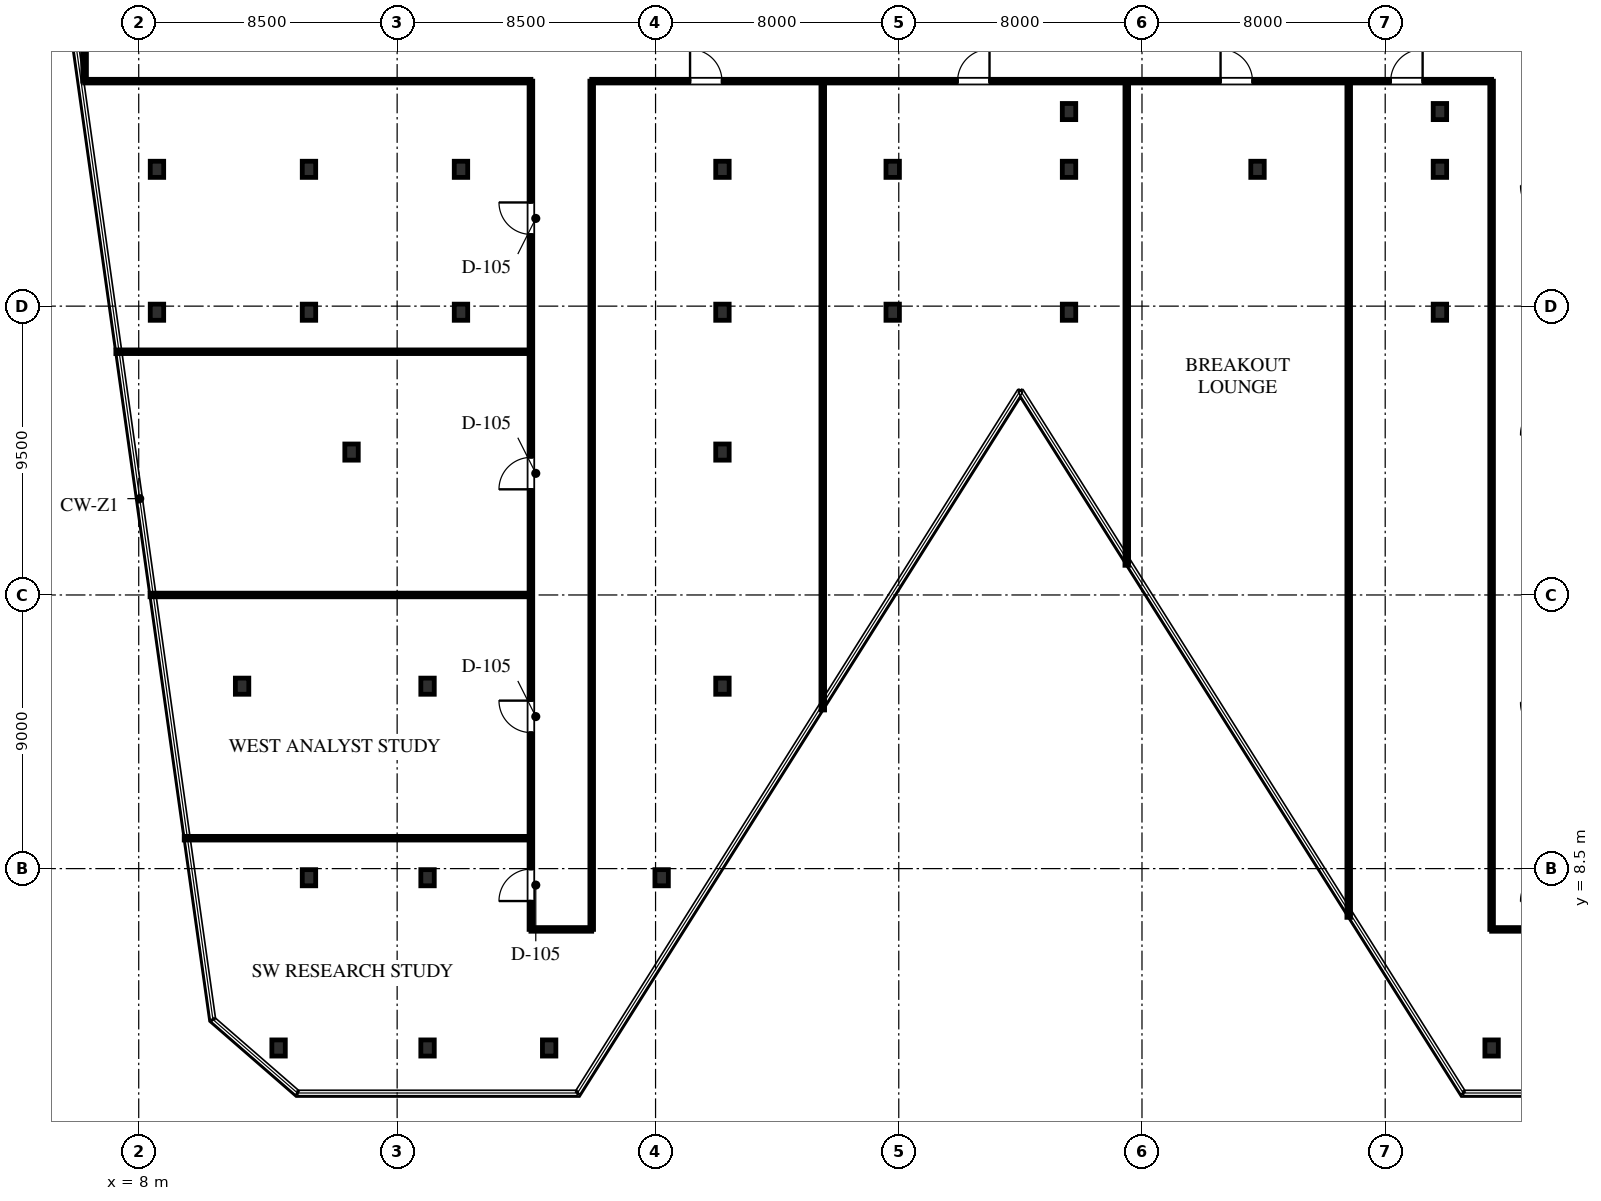
"""IFC4 building model, lengths in metres.
Left out: names, types, materials, properties, quantities, classifications, styles, units other than length and angle.
Written with IfcOpenShell. Run it as: python <this file> out.ifc"""

import sys

from ifc_helpers import new_model, si_unit, direction, frame, frame_2d, origin, origin_2d, place, context, subcontext, project, spatial, rectangle, i_section, extrude, element, fill, save


model = new_model("IFC4")
c1 = context("Model", 3, precision=1e-05, world=origin(), true_north=direction((0.0, 1.0)))
c2 = subcontext(c1, "Body", "Model", "MODEL_VIEW")
j1 = project(units=[si_unit("LENGTHUNIT", "METRE"), si_unit("PLANEANGLEUNIT", "RADIAN")], contexts=[c1])
p1 = place(None, origin())
s1 = spatial("IfcSite", under=j1, at=p1, CompositionType="ELEMENT")
p2 = place(p1, origin())
s2 = spatial("IfcBuilding", under=s1, at=p2, CompositionType="ELEMENT")
p3 = place(p2, frame((0.0, 0.0, 53.5)))
s3 = spatial("IfcBuildingStorey", under=s2, at=p3, CompositionType="ELEMENT", Elevation=53.5)
for number, where, z_axis, x_axis in (
    (1, (12.6, 2.6, 0.0), (0.0, 0.0, 1.0), (1.0, 0.0, 0.0)),
    (2, (15.0, 22.2, 0.0), (0.0, 0.0, 1.0), (1.0, 0.0, 0.0)),
    (3, (27.2, 22.2, 0.0), (0.0, 0.0, 1.0), (1.0, 0.0, 0.0)),
    (4, (8.6, 26.8, 0.0), (0.0, 0.0, 1.0), (1.0, 0.0, 0.0)),
    (5, (13.6, 26.8, 0.0), (0.0, 0.0, 1.0), (1.0, 0.0, 0.0)),
    (6, (18.6, 26.8, 0.0), (0.0, 0.0, 1.0), (1.0, 0.0, 0.0)),
    (7, (27.2, 26.8, 0.0), (0.0, 0.0, 1.0), (1.0, 0.0, 0.0)),
    (8, (32.8, 26.8, 0.0), (0.0, 0.0, 1.0), (1.0, 0.0, 0.0)),
    (9, (38.6, 26.8, 0.0), (0.0, 0.0, 1.0), (1.0, 0.0, 0.0)),
    (10, (50.8, 26.8, 0.0), (0.0, 0.0, 1.0), (1.0, 0.0, 0.0)),
    (11, (8.6, 31.5, 0.0), (0.0, 0.0, 1.0), (1.0, 0.0, 0.0)),
    (12, (13.6, 31.5, 0.0), (0.0, 0.0, 1.0), (1.0, 0.0, 0.0)),
    (13, (17.5, 2.6, 0.0), (0.0, 0.0, 1.0), (1.0, 0.0, 0.0)),
    (14, (18.6, 31.5, 0.0), (0.0, 0.0, 1.0), (1.0, 0.0, 0.0)),
    (15, (27.2, 31.5, 0.0), (0.0, 0.0, 1.0), (1.0, 0.0, 0.0)),
    (16, (32.8, 31.5, 0.0), (0.0, 0.0, 1.0), (1.0, 0.0, 0.0)),
    (17, (38.6, 31.5, 0.0), (0.0, 0.0, 1.0), (1.0, 0.0, 0.0)),
    (18, (44.8, 31.5, 0.0), (0.0, 0.0, 1.0), (1.0, 0.0, 0.0)),
    (19, (50.8, 31.5, 0.0), (0.0, 0.0, 1.0), (1.0, 0.0, 0.0)),
    (20, (21.5, 2.6, 0.0), (0.0, 0.0, 1.0), (1.0, 0.0, 0.0)),
    (21, (52.5, 2.6, 0.0), (0.0, 0.0, 1.0), (1.0, 0.0, 0.0)),
    (22, (13.6, 8.2, 0.0), (0.0, 0.0, 1.0), (1.0, 0.0, 0.0)),
    (23, (17.5, 8.2, 0.0), (0.0, 0.0, 1.0), (1.0, 0.0, 0.0)),
    (24, (25.2, 8.2, 0.0), (0.0, 0.0, 1.0), (1.0, 0.0, 0.0)),
    (25, (11.4, 14.5, 0.0), (0.0, 0.0, 1.0), (1.0, 0.0, 0.0)),
    (26, (17.5, 14.5, 0.0), (0.0, 0.0, 1.0), (1.0, 0.0, 0.0)),
    (27, (27.2, 14.5, 0.0), (0.0, 0.0, 1.0), (1.0, 0.0, 0.0)),
    (28, (38.6, 33.4, 0.0), (0.0, 0.0, 1.0), (1.0, 0.0, 0.0)),
    (29, (50.8, 33.4, 0.0), (0.0, 0.0, 1.0), (1.0, 0.0, 0.0)),
):
    element("IfcColumn", number, at=place(p3, frame(where, z_axis=z_axis, x_axis=x_axis)), inside=s3, PredefinedType="COLUMN", context=c2, shape_type="SweptSolid", body=[
        extrude(i_section(OverallWidth=0.442, OverallDepth=0.531, WebThickness=0.066, FlangeThickness=0.106, FilletRadius=0.03, at=origin_2d()), origin(), (0.0, 0.0, 1.0), 4.0),
    ])
p4 = place(p3, frame((6.22, 34.4, 0.0), z_axis=(0.0, 0.0, 1.0), x_axis=(1.0, 0.0, 0.0)))
e30 = element("IfcWall", 30, at=p4, inside=s3, PredefinedType="PARTITIONING", context=c2, shape_type="SweptSolid", body=[
    extrude(rectangle(XDim=14.68, YDim=0.12, at=frame_2d((7.34, 0.0))), origin(), (0.0, 0.0, 1.0), 2.813),
])
p5 = place(p3, frame((22.9, 34.4, 0.0), z_axis=(0.0, 0.0, 1.0), x_axis=(1.0, 0.0, 0.0)))
e31 = element("IfcWall", 31, at=p5, inside=s3, PredefinedType="PARTITIONING", context=c2, shape_type="SweptSolid", body=[
    extrude(rectangle(XDim=29.6, YDim=0.12, at=frame_2d((14.8, 0.0))), origin(), (0.0, 0.0, 1.0), 2.813),
])
p6 = place(p5, frame((3.235, 0.0, 0.0)))
e32 = element("IfcOpeningElement", 32, at=p6, cuts=e31, PredefinedType="OPENING", context=c2, shape_type="SweptSolid", body=[
    extrude(rectangle(XDim=1.05, YDim=2.2, at=frame_2d((0.525, 1.1))), frame((0.0, 0.07, 0.0), z_axis=(0.0, -1.0, 0.0), x_axis=(1.0, 0.0, 0.0)), (0.0, 0.0, 1.0), 0.14),
])
p7 = place(p5, frame((12.035, 0.0, 0.0)))
e33 = element("IfcOpeningElement", 33, at=p7, cuts=e31, PredefinedType="OPENING", context=c2, shape_type="SweptSolid", body=[
    extrude(rectangle(XDim=1.05, YDim=2.2, at=frame_2d((0.525, 1.1))), frame((0.0, 0.07, 0.0), z_axis=(0.0, -1.0, 0.0), x_axis=(1.0, 0.0, 0.0)), (0.0, 0.0, 1.0), 0.14),
])
p8 = place(p5, frame((20.685, 0.0, 0.0)))
e34 = element("IfcOpeningElement", 34, at=p8, cuts=e31, PredefinedType="OPENING", context=c2, shape_type="SweptSolid", body=[
    extrude(rectangle(XDim=1.05, YDim=2.2, at=frame_2d((0.525, 1.1))), frame((0.0, 0.07, 0.0), z_axis=(0.0, -1.0, 0.0), x_axis=(1.0, 0.0, 0.0)), (0.0, 0.0, 1.0), 0.14),
])
p9 = place(p5, frame((26.281, 0.0, 0.0)))
e35 = element("IfcOpeningElement", 35, at=p9, cuts=e31, PredefinedType="OPENING", context=c2, shape_type="SweptSolid", body=[
    extrude(rectangle(XDim=1.05, YDim=2.2, at=frame_2d((0.525, 1.1))), frame((0.0, 0.07, 0.0), z_axis=(0.0, -1.0, 0.0), x_axis=(1.0, 0.0, 0.0)), (0.0, 0.0, 1.0), 0.14),
])
p10 = place(p3, frame((6.22, 34.4, 0.0), z_axis=(0.0, 0.0, 1.0), x_axis=(0.0, 1.0, 0.0)))
e36 = element("IfcWall", 36, at=p10, inside=s3, PredefinedType="PARTITIONING", context=c2, shape_type="SweptSolid", body=[
    extrude(rectangle(XDim=3.65, YDim=0.12, at=frame_2d((1.825, 0.0))), origin(), (0.0, 0.0, 1.0), 3.74),
])
p11 = place(p3, frame((20.9, 6.5, 0.0), z_axis=(0.0, 0.0, 1.0), x_axis=(0.0, 1.0, 0.0)))
e37 = element("IfcWall", 37, at=p11, inside=s3, PredefinedType="PARTITIONING", context=c2, shape_type="SweptSolid", body=[
    extrude(rectangle(XDim=27.9, YDim=0.12, at=frame_2d((13.95, 0.0))), origin(), (0.0, 0.0, 1.0), 2.813),
])
p12 = place(p11, frame((0.933, 0.0, 0.0)))
e38 = element("IfcOpeningElement", 38, at=p12, cuts=e37, PredefinedType="OPENING", context=c2, shape_type="SweptSolid", body=[
    extrude(rectangle(XDim=1.05, YDim=2.2, at=frame_2d((0.525, 1.1))), frame((0.0, 0.07, 0.0), z_axis=(0.0, -1.0, 0.0), x_axis=(1.0, 0.0, 0.0)), (0.0, 0.0, 1.0), 0.14),
])
p13 = place(p11, frame((6.475, 0.0, 0.0)))
e39 = element("IfcOpeningElement", 39, at=p13, cuts=e37, PredefinedType="OPENING", context=c2, shape_type="SweptSolid", body=[
    extrude(rectangle(XDim=1.05, YDim=2.2, at=frame_2d((0.525, 1.1))), frame((0.0, 0.07, 0.0), z_axis=(0.0, -1.0, 0.0), x_axis=(1.0, 0.0, 0.0)), (0.0, 0.0, 1.0), 0.14),
])
p14 = place(p11, frame((14.475, 0.0, 0.0)))
e40 = element("IfcOpeningElement", 40, at=p14, cuts=e37, PredefinedType="OPENING", context=c2, shape_type="SweptSolid", body=[
    extrude(rectangle(XDim=1.05, YDim=2.2, at=frame_2d((0.525, 1.1))), frame((0.0, 0.07, 0.0), z_axis=(0.0, -1.0, 0.0), x_axis=(1.0, 0.0, 0.0)), (0.0, 0.0, 1.0), 0.14),
])
p15 = place(p11, frame((22.86, 0.0, 0.0)))
e41 = element("IfcOpeningElement", 41, at=p15, cuts=e37, PredefinedType="OPENING", context=c2, shape_type="SweptSolid", body=[
    extrude(rectangle(XDim=1.05, YDim=2.2, at=frame_2d((0.525, 1.1))), frame((0.0, 0.07, 0.0), z_axis=(0.0, -1.0, 0.0), x_axis=(1.0, 0.0, 0.0)), (0.0, 0.0, 1.0), 0.14),
])
p16 = place(p3, frame((22.9, 6.5, 0.0), z_axis=(0.0, 0.0, 1.0), x_axis=(0.0, 1.0, 0.0)))
e42 = element("IfcWall", 42, at=p16, inside=s3, PredefinedType="PARTITIONING", context=c2, shape_type="SweptSolid", body=[
    extrude(rectangle(XDim=27.9, YDim=0.12, at=frame_2d((13.95, 0.0))), origin(), (0.0, 0.0, 1.0), 2.813),
])
p17 = place(p3, frame((20.9, 6.5, 0.0), z_axis=(0.0, 0.0, 1.0), x_axis=(1.0, 0.0, 0.0)))
e43 = element("IfcWall", 43, at=p17, inside=s3, PredefinedType="PARTITIONING", context=c2, shape_type="SweptSolid", body=[
    extrude(rectangle(XDim=2.0, YDim=0.12, at=frame_2d((1.0, 0.0))), origin(), (0.0, 0.0, 1.0), 2.978),
])
p18 = place(p3, frame((52.5, 6.5, 0.0), z_axis=(0.0, 0.0, 1.0), x_axis=(0.0, 1.0, 0.0)))
e44 = element("IfcWall", 44, at=p18, inside=s3, PredefinedType="PARTITIONING", context=c2, shape_type="SweptSolid", body=[
    extrude(rectangle(XDim=27.9, YDim=0.12, at=frame_2d((13.95, 0.0))), origin(), (0.0, 0.0, 1.0), 2.813),
])
p19 = place(p3, frame((52.5, 6.5, 0.0), z_axis=(0.0, 0.0, 1.0), x_axis=(1.0, 0.0, 0.0)))
e45 = element("IfcWall", 45, at=p19, inside=s3, PredefinedType="PARTITIONING", context=c2, shape_type="SweptSolid", body=[
    extrude(rectangle(XDim=2.0, YDim=0.12, at=frame_2d((1.0, 0.0))), origin(), (0.0, 0.0, 1.0), 2.978),
])
p20 = place(p3, frame((9.496, 9.5, 0.0), z_axis=(0.0, 0.0, 1.0), x_axis=(1.0, 0.0, 0.0)))
e46 = element("IfcWall", 46, at=p20, inside=s3, PredefinedType="PARTITIONING", context=c2, shape_type="SweptSolid", body=[
    extrude(rectangle(XDim=11.336, YDim=0.12, at=frame_2d((5.668, 0.0))), origin(), (0.0, 0.0, 1.0), 2.813),
])
p21 = place(p3, frame((8.372, 17.5, 0.0), z_axis=(0.0, 0.0, 1.0), x_axis=(1.0, 0.0, 0.0)))
e47 = element("IfcWall", 47, at=p21, inside=s3, PredefinedType="PARTITIONING", context=c2, shape_type="SweptSolid", body=[
    extrude(rectangle(XDim=12.46, YDim=0.12, at=frame_2d((6.23, 0.0))), origin(), (0.0, 0.0, 1.0), 2.978),
])
p22 = place(p3, frame((7.248, 25.5, 0.0), z_axis=(0.0, 0.0, 1.0), x_axis=(1.0, 0.0, 0.0)))
e48 = element("IfcWall", 48, at=p22, inside=s3, PredefinedType="PARTITIONING", context=c2, shape_type="SweptSolid", body=[
    extrude(rectangle(XDim=13.584, YDim=0.12, at=frame_2d((6.792, 0.0))), origin(), (0.0, 0.0, 1.0), 2.978),
])
p23 = place(p3, frame((30.5, 13.718, 0.0), z_axis=(0.0, 0.0, 1.0), x_axis=(0.0, 1.0, 0.0)))
e49 = element("IfcWall", 49, at=p23, inside=s3, PredefinedType="PARTITIONING", context=c2, shape_type="SweptSolid", body=[
    extrude(rectangle(XDim=20.614, YDim=0.12, at=frame_2d((10.307, 0.0))), origin(), (0.0, 0.0, 1.0), 2.813),
])
p24 = place(p3, frame((40.5, 18.476, 0.0), z_axis=(0.0, 0.0, 1.0), x_axis=(0.0, 1.0, 0.0)))
e50 = element("IfcWall", 50, at=p24, inside=s3, PredefinedType="PARTITIONING", context=c2, shape_type="SweptSolid", body=[
    extrude(rectangle(XDim=15.856, YDim=0.12, at=frame_2d((7.928, 0.0))), origin(), (0.0, 0.0, 1.0), 2.813),
])
p25 = place(p3, frame((47.8, 6.897, 0.0), z_axis=(0.0, 0.0, 1.0), x_axis=(0.0, 1.0, 0.0)))
e51 = element("IfcWall", 51, at=p25, inside=s3, PredefinedType="PARTITIONING", context=c2, shape_type="SweptSolid", body=[
    extrude(rectangle(XDim=27.435, YDim=0.12, at=frame_2d((13.717, 0.0))), origin(), (0.0, 0.0, 1.0), 2.813),
])
p26 = place(p12, origin())
e52 = element("IfcDoor", 52, at=p26, inside=s3, OperationType="SINGLE_SWING_LEFT", PredefinedType="DOOR", context=c2, shape_type="SweptSolid", body=[
    extrude(rectangle(XDim=1.05, YDim=2.2, at=frame_2d((0.525, 1.1))), frame((0.0, 0.025, 0.0), z_axis=(0.0, -1.0, 0.0), x_axis=(1.0, 0.0, 0.0)), (0.0, 0.0, 1.0), 0.05),
])
fill(e38, e52)
p27 = place(p13, origin())
e53 = element("IfcDoor", 53, at=p27, inside=s3, OperationType="SINGLE_SWING_RIGHT", PredefinedType="DOOR", context=c2, shape_type="SweptSolid", body=[
    extrude(rectangle(XDim=1.05, YDim=2.2, at=frame_2d((0.525, 1.1))), frame((0.0, 0.025, 0.0), z_axis=(0.0, -1.0, 0.0), x_axis=(1.0, 0.0, 0.0)), (0.0, 0.0, 1.0), 0.05),
])
fill(e39, e53)
p28 = place(p14, origin())
e54 = element("IfcDoor", 54, at=p28, inside=s3, OperationType="SINGLE_SWING_LEFT", PredefinedType="DOOR", context=c2, shape_type="SweptSolid", body=[
    extrude(rectangle(XDim=1.05, YDim=2.2, at=frame_2d((0.525, 1.1))), frame((0.0, 0.025, 0.0), z_axis=(0.0, -1.0, 0.0), x_axis=(1.0, 0.0, 0.0)), (0.0, 0.0, 1.0), 0.05),
])
fill(e40, e54)
p29 = place(p15, origin())
e55 = element("IfcDoor", 55, at=p29, inside=s3, OperationType="SINGLE_SWING_RIGHT", PredefinedType="DOOR", context=c2, shape_type="SweptSolid", body=[
    extrude(rectangle(XDim=1.05, YDim=2.2, at=frame_2d((0.525, 1.1))), frame((0.0, 0.025, 0.0), z_axis=(0.0, -1.0, 0.0), x_axis=(1.0, 0.0, 0.0)), (0.0, 0.0, 1.0), 0.05),
])
fill(e41, e55)
p30 = place(p6, origin())
e56 = element("IfcDoor", 56, at=p30, inside=s3, OperationType="SINGLE_SWING_LEFT", PredefinedType="DOOR", context=c2, shape_type="SweptSolid", body=[
    extrude(rectangle(XDim=1.05, YDim=2.2, at=frame_2d((0.525, 1.1))), frame((0.0, 0.025, 0.0), z_axis=(0.0, -1.0, 0.0), x_axis=(1.0, 0.0, 0.0)), (0.0, 0.0, 1.0), 0.05),
])
fill(e32, e56)
p31 = place(p7, origin())
e57 = element("IfcDoor", 57, at=p31, inside=s3, OperationType="SINGLE_SWING_RIGHT", PredefinedType="DOOR", context=c2, shape_type="SweptSolid", body=[
    extrude(rectangle(XDim=1.05, YDim=2.2, at=frame_2d((0.525, 1.1))), frame((0.0, 0.025, 0.0), z_axis=(0.0, -1.0, 0.0), x_axis=(1.0, 0.0, 0.0)), (0.0, 0.0, 1.0), 0.05),
])
fill(e33, e57)
p32 = place(p8, origin())
e58 = element("IfcDoor", 58, at=p32, inside=s3, OperationType="SINGLE_SWING_LEFT", PredefinedType="DOOR", context=c2, shape_type="SweptSolid", body=[
    extrude(rectangle(XDim=1.05, YDim=2.2, at=frame_2d((0.525, 1.1))), frame((0.0, 0.025, 0.0), z_axis=(0.0, -1.0, 0.0), x_axis=(1.0, 0.0, 0.0)), (0.0, 0.0, 1.0), 0.05),
])
fill(e34, e58)
p33 = place(p9, origin())
e59 = element("IfcDoor", 59, at=p33, inside=s3, OperationType="SINGLE_SWING_RIGHT", PredefinedType="DOOR", context=c2, shape_type="SweptSolid", body=[
    extrude(rectangle(XDim=1.05, YDim=2.2, at=frame_2d((0.525, 1.1))), frame((0.0, 0.025, 0.0), z_axis=(0.0, -1.0, 0.0), x_axis=(1.0, 0.0, 0.0)), (0.0, 0.0, 1.0), 0.05),
])
fill(e35, e59)
save(model, sys.argv[1])
